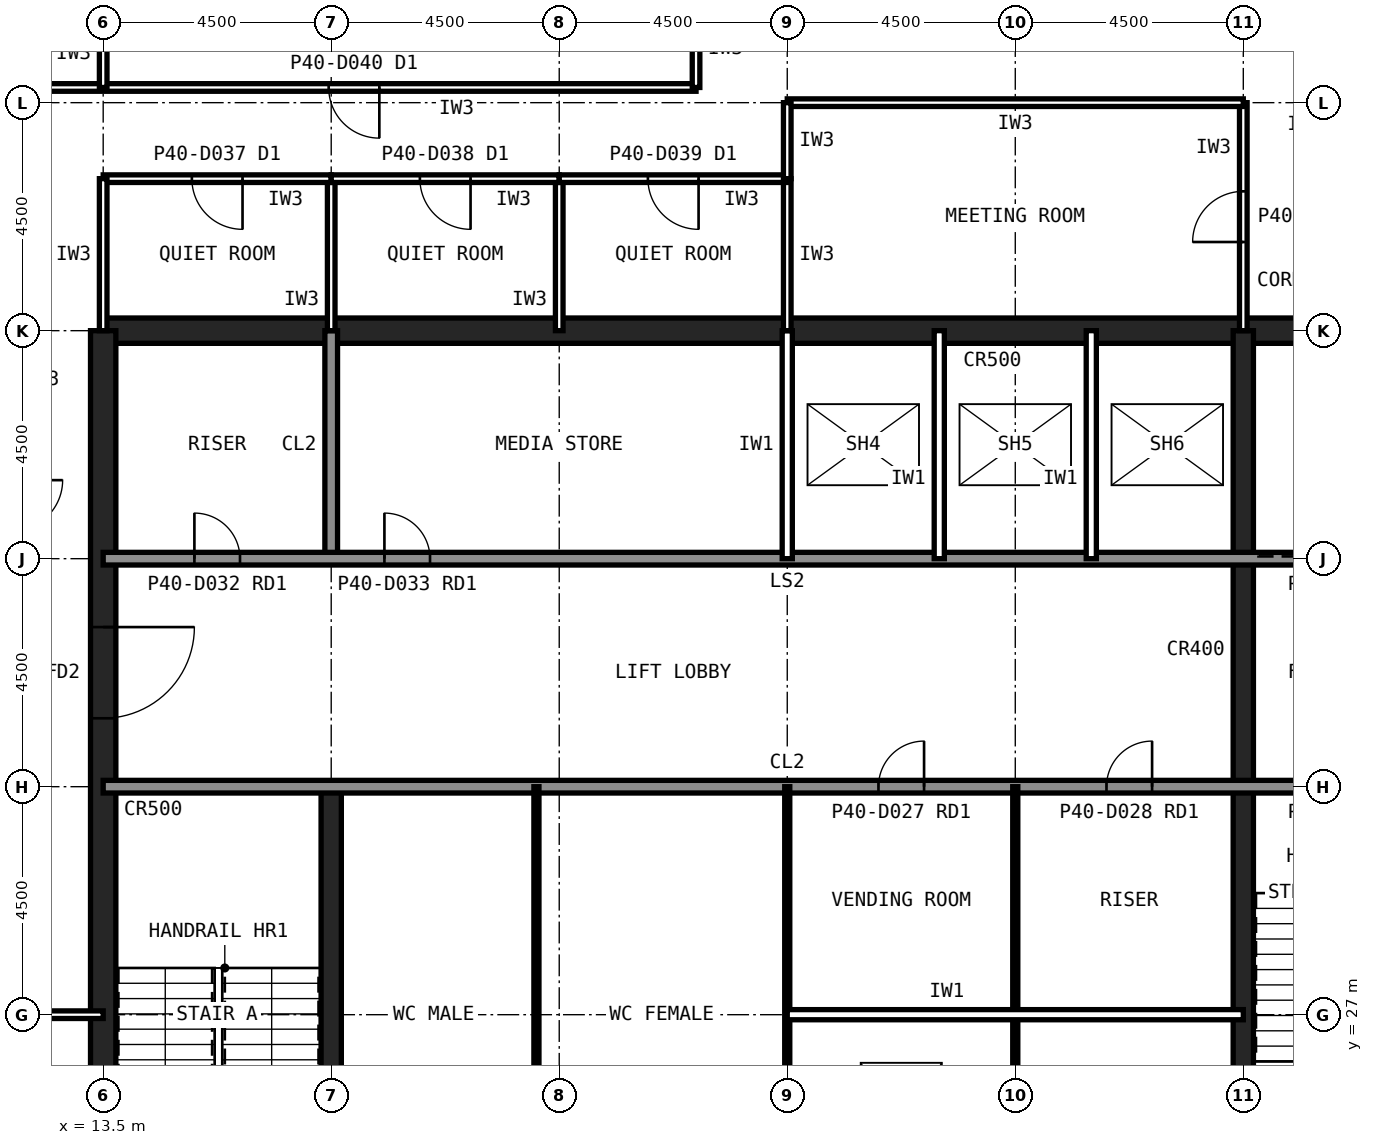
"""IFC4 building model, lengths in metres.
Left out: names, types, materials, properties, quantities, classifications, styles, units other than length and angle.
Written with IfcOpenShell. Run it as: python <this file> out.ifc"""

import sys

from ifc_helpers import new_model, si_unit, direction, frame, frame_2d, origin, place, context, subcontext, project, spatial, rectangle, extrude, element, fill, save


model = new_model("IFC4")
c1 = context("Model", 3, precision=1e-05, world=origin(), true_north=direction((0.0, 1.0)))
c2 = subcontext(c1, "Body", "Model", "MODEL_VIEW")
j1 = project(units=[si_unit("LENGTHUNIT", "METRE"), si_unit("PLANEANGLEUNIT", "RADIAN")], contexts=[c1])
p1 = place(None, origin())
s1 = spatial("IfcSite", under=j1, at=p1, CompositionType="ELEMENT")
p2 = place(p1, origin())
s2 = spatial("IfcBuilding", under=s1, at=p2, CompositionType="ELEMENT")
p3 = place(p2, frame((0.0, 0.0, 167.6)))
s3 = spatial("IfcBuildingStorey", under=s2, at=p3, CompositionType="ELEMENT", Elevation=167.6)
p4 = place(p3, frame((40.5, 40.5, 0.0), z_axis=(0.0, 0.0, 1.0), x_axis=(-1.0, 0.0, 0.0)))
e1 = element("IfcWall", 1, at=p4, inside=s3, PredefinedType="SHEAR", context=c2, shape_type="SweptSolid", body=[
    extrude(rectangle(XDim=27.0, YDim=0.5, at=frame_2d((13.5, 0.0))), origin(), (0.0, 0.0, 1.0), 4.0),
])
p5 = place(p3, frame((13.5, 40.5, 0.0), z_axis=(0.0, 0.0, 1.0), x_axis=(0.0, -1.0, 0.0)))
e2 = element("IfcWall", 2, at=p5, inside=s3, PredefinedType="SHEAR", context=c2, shape_type="SweptSolid", body=[
    extrude(rectangle(XDim=27.0, YDim=0.5, at=frame_2d((13.5, 0.0))), origin(), (0.0, 0.0, 1.0), 4.0),
])
p6 = place(p5, frame((19.65, 0.0, 0.0)))
e3 = element("IfcOpeningElement", 3, at=p6, cuts=e2, PredefinedType="OPENING", context=c2, shape_type="SweptSolid", body=[
    extrude(rectangle(XDim=1.2, YDim=2.1, at=frame_2d((0.6, 1.05))), frame((0.0, 0.26, 0.0), z_axis=(0.0, -1.0, 0.0), x_axis=(1.0, 0.0, 0.0)), (0.0, 0.0, 1.0), 0.52),
])
p7 = place(p5, frame((5.85, 0.0, 0.0)))
e4 = element("IfcOpeningElement", 4, at=p7, cuts=e2, PredefinedType="OPENING", context=c2, shape_type="SweptSolid", body=[
    extrude(rectangle(XDim=1.8, YDim=2.1, at=frame_2d((0.9, 1.05))), frame((0.0, 0.26, 0.0), z_axis=(0.0, -1.0, 0.0), x_axis=(1.0, 0.0, 0.0)), (0.0, 0.0, 1.0), 0.52),
])
p8 = place(p3, frame((18.0, 13.5, 0.0), z_axis=(0.0, 0.0, 1.0), x_axis=(0.0, 1.0, 0.0)))
e5 = element("IfcWall", 5, at=p8, inside=s3, PredefinedType="SHEAR", context=c2, shape_type="SweptSolid", body=[
    extrude(rectangle(XDim=18.0, YDim=0.4, at=frame_2d((9.0, 0.0))), origin(), (0.0, 0.0, 1.0), 4.0),
])
p9 = place(p3, frame((18.0, 36.0, 0.0), z_axis=(0.0, 0.0, 1.0), x_axis=(0.0, 1.0, 0.0)))
e6 = element("IfcWall", 6, at=p9, inside=s3, PredefinedType="SOLIDWALL", context=c2, shape_type="SweptSolid", body=[
    extrude(rectangle(XDim=4.5, YDim=0.25, at=frame_2d((2.25, 0.0))), origin(), (0.0, 0.0, 1.0), 3.84),
])
p10 = place(p3, frame((36.0, 22.5, 0.0), z_axis=(0.0, 0.0, 1.0), x_axis=(0.0, 1.0, 0.0)))
e7 = element("IfcWall", 7, at=p10, inside=s3, PredefinedType="SHEAR", context=c2, shape_type="SweptSolid", body=[
    extrude(rectangle(XDim=18.0, YDim=0.4, at=frame_2d((9.0, 0.0))), origin(), (0.0, 0.0, 1.0), 4.0),
])
p11 = place(p3, frame((13.5, 36.0, 0.0), z_axis=(0.0, 0.0, 1.0), x_axis=(1.0, 0.0, 0.0)))
e8 = element("IfcWall", 8, at=p11, inside=s3, PredefinedType="SOLIDWALL", context=c2, shape_type="SweptSolid", body=[
    extrude(rectangle(XDim=27.0, YDim=0.25, at=frame_2d((13.5, 0.0))), origin(), (0.0, 0.0, 1.0), 3.84),
])
p12 = place(p11, frame((1.8, 0.0, 0.0)))
e9 = element("IfcOpeningElement", 9, at=p12, cuts=e8, PredefinedType="OPENING", context=c2, shape_type="SweptSolid", body=[
    extrude(rectangle(XDim=0.9, YDim=2.1, at=frame_2d((0.45, 1.05))), frame((0.0, 0.135, 0.0), z_axis=(0.0, -1.0, 0.0), x_axis=(1.0, 0.0, 0.0)), (0.0, 0.0, 1.0), 0.27),
])
p13 = place(p11, frame((5.55, 0.0, 0.0)))
e10 = element("IfcOpeningElement", 10, at=p13, cuts=e8, PredefinedType="OPENING", context=c2, shape_type="SweptSolid", body=[
    extrude(rectangle(XDim=0.9, YDim=2.1, at=frame_2d((0.45, 1.05))), frame((0.0, 0.135, 0.0), z_axis=(0.0, -1.0, 0.0), x_axis=(1.0, 0.0, 0.0)), (0.0, 0.0, 1.0), 0.27),
])
p14 = place(p11, frame((8.55, 0.0, 0.0)))
e11 = element("IfcOpeningElement", 11, at=p14, cuts=e8, PredefinedType="OPENING", context=c2, shape_type="SweptSolid", body=[
    extrude(rectangle(XDim=0.9, YDim=2.1, at=frame_2d((0.45, 1.05))), frame((0.0, 0.135, 0.0), z_axis=(0.0, -1.0, 0.0), x_axis=(1.0, 0.0, 0.0)), (0.0, 0.0, 1.0), 0.27),
])
p15 = place(p11, frame((24.1, 0.0, 0.0)))
e12 = element("IfcOpeningElement", 12, at=p15, cuts=e8, PredefinedType="OPENING", context=c2, shape_type="SweptSolid", body=[
    extrude(rectangle(XDim=1.3, YDim=2.2, at=frame_2d((0.65, 1.1))), frame((0.0, 0.135, 0.0), z_axis=(0.0, -1.0, 0.0), x_axis=(1.0, 0.0, 0.0)), (0.0, 0.0, 1.0), 0.27),
])
p16 = place(p3, frame((13.5, 31.5, 0.0), z_axis=(0.0, 0.0, 1.0), x_axis=(1.0, 0.0, 0.0)))
e13 = element("IfcWall", 13, at=p16, inside=s3, PredefinedType="SOLIDWALL", context=c2, shape_type="SweptSolid", body=[
    extrude(rectangle(XDim=27.0, YDim=0.25, at=frame_2d((13.5, 0.0))), origin(), (0.0, 0.0, 1.0), 3.84),
])
p17 = place(p16, frame((24.15, 0.0, 0.0)))
e14 = element("IfcOpeningElement", 14, at=p17, cuts=e13, PredefinedType="OPENING", context=c2, shape_type="SweptSolid", body=[
    extrude(rectangle(XDim=1.2, YDim=2.1, at=frame_2d((0.6, 1.05))), frame((0.0, 0.135, 0.0), z_axis=(0.0, -1.0, 0.0), x_axis=(1.0, 0.0, 0.0)), (0.0, 0.0, 1.0), 0.27),
])
p18 = place(p16, frame((15.3, 0.0, 0.0)))
e15 = element("IfcOpeningElement", 15, at=p18, cuts=e13, PredefinedType="OPENING", context=c2, shape_type="SweptSolid", body=[
    extrude(rectangle(XDim=0.9, YDim=2.1, at=frame_2d((0.45, 1.05))), frame((0.0, 0.135, 0.0), z_axis=(0.0, -1.0, 0.0), x_axis=(1.0, 0.0, 0.0)), (0.0, 0.0, 1.0), 0.27),
])
p19 = place(p16, frame((19.8, 0.0, 0.0)))
e16 = element("IfcOpeningElement", 16, at=p19, cuts=e13, PredefinedType="OPENING", context=c2, shape_type="SweptSolid", body=[
    extrude(rectangle(XDim=0.9, YDim=2.1, at=frame_2d((0.45, 1.05))), frame((0.0, 0.135, 0.0), z_axis=(0.0, -1.0, 0.0), x_axis=(1.0, 0.0, 0.0)), (0.0, 0.0, 1.0), 0.27),
])
for number, where, z_axis, x_axis in (
    (17, (21.0, 36.0, 0.0), (0.0, 0.0, 1.0), (0.0, 1.0, 0.0)),
    (18, (27.0, 36.0, 0.0), (0.0, 0.0, 1.0), (0.0, 1.0, 0.0)),
    (19, (30.0, 36.0, 0.0), (0.0, 0.0, 1.0), (0.0, 1.0, 0.0)),
    (20, (33.0, 36.0, 0.0), (0.0, 0.0, 1.0), (0.0, 1.0, 0.0)),
):
    element("IfcWall", number, at=place(p3, frame(where, z_axis=z_axis, x_axis=x_axis)), inside=s3, PredefinedType="PARTITIONING", context=c2, shape_type="SweptSolid", body=[
        extrude(rectangle(XDim=4.5, YDim=0.2, at=frame_2d((2.25, 0.0))), origin(), (0.0, 0.0, 1.0), 3.84),
    ])
for number, where, z_axis, x_axis in (
    (21, (22.05, 22.5, 0.0), (0.0, 0.0, 1.0), (0.0, 1.0, 0.0)),
    (22, (27.0, 22.5, 0.0), (0.0, 0.0, 1.0), (0.0, 1.0, 0.0)),
    (23, (31.5, 22.5, 0.0), (0.0, 0.0, 1.0), (0.0, 1.0, 0.0)),
):
    element("IfcWall", number, at=place(p3, frame(where, z_axis=z_axis, x_axis=x_axis)), inside=s3, PredefinedType="PLUMBINGWALL", context=c2, shape_type="SweptSolid", body=[
        extrude(rectangle(XDim=9.0, YDim=0.1, at=frame_2d((4.5, 0.0))), origin(), (0.0, 0.0, 1.0), 3.84),
    ])
p20 = place(p3, frame((27.0, 27.0, 0.0), z_axis=(0.0, 0.0, 1.0), x_axis=(1.0, 0.0, 0.0)))
e24 = element("IfcWall", 24, at=p20, inside=s3, PredefinedType="PARTITIONING", context=c2, shape_type="SweptSolid", body=[
    extrude(rectangle(XDim=9.0, YDim=0.2, at=frame_2d((4.5, 0.0))), origin(), (0.0, 0.0, 1.0), 3.84),
])
p21 = place(p3, frame((0.36, 27.0, 0.0), z_axis=(0.0, 0.0, 1.0), x_axis=(1.0, 0.0, 0.0)))
e25 = element("IfcWall", 25, at=p21, inside=s3, PredefinedType="PARTITIONING", context=c2, shape_type="SweptSolid", body=[
    extrude(rectangle(XDim=13.14, YDim=0.15, at=frame_2d((6.57, 0.0))), origin(), (0.0, 0.0, 1.0), 2.989),
])
p22 = place(p3, frame((25.2, 45.3, 0.0), z_axis=(0.0, 0.0, 1.0), x_axis=(-1.0, 0.0, 0.0)))
e26 = element("IfcWall", 26, at=p22, inside=s3, PredefinedType="PARTITIONING", context=c2, shape_type="SweptSolid", body=[
    extrude(rectangle(XDim=13.5, YDim=0.15, at=frame_2d((6.75, 0.0))), origin(), (0.0, 0.0, 1.0), 3.84),
])
p23 = place(p22, frame((6.25, 0.0, 0.0)))
e27 = element("IfcOpeningElement", 27, at=p23, cuts=e26, PredefinedType="OPENING", context=c2, shape_type="SweptSolid", body=[
    extrude(rectangle(XDim=1.0, YDim=2.1, at=frame_2d((0.5, 1.05))), frame((0.0, 0.085, 0.0), z_axis=(0.0, -1.0, 0.0), x_axis=(1.0, 0.0, 0.0)), (0.0, 0.0, 1.0), 0.17),
])
p24 = place(p3, frame((25.2, 46.8, 0.0), z_axis=(0.0, 0.0, 1.0), x_axis=(0.0, -1.0, 0.0)))
e28 = element("IfcWall", 28, at=p24, inside=s3, PredefinedType="PARTITIONING", context=c2, shape_type="SweptSolid", body=[
    extrude(rectangle(XDim=1.5, YDim=0.15, at=frame_2d((0.75, 0.0))), origin(), (0.0, 0.0, 1.0), 3.84),
])
p25 = place(p3, frame((18.0, 40.5, 0.0), z_axis=(0.0, 0.0, 1.0), x_axis=(0.0, 1.0, 0.0)))
e29 = element("IfcWall", 29, at=p25, inside=s3, PredefinedType="PARTITIONING", context=c2, shape_type="SweptSolid", body=[
    extrude(rectangle(XDim=3.0, YDim=0.15, at=frame_2d((1.5, 0.0))), origin(), (0.0, 0.0, 1.0), 2.989),
])
p26 = place(p3, frame((18.0, 43.5, 0.0), z_axis=(0.0, 0.0, 1.0), x_axis=(-1.0, 0.0, 0.0)))
e30 = element("IfcWall", 30, at=p26, inside=s3, PredefinedType="PARTITIONING", context=c2, shape_type="SweptSolid", body=[
    extrude(rectangle(XDim=4.5, YDim=0.15, at=frame_2d((2.25, 0.0))), origin(), (0.0, 0.0, 1.0), 3.84),
])
p27 = place(p26, frame((1.75, 0.0, 0.0)))
e31 = element("IfcOpeningElement", 31, at=p27, cuts=e30, PredefinedType="OPENING", context=c2, shape_type="SweptSolid", body=[
    extrude(rectangle(XDim=1.0, YDim=2.1, at=frame_2d((0.5, 1.05))), frame((0.0, 0.085, 0.0), z_axis=(0.0, -1.0, 0.0), x_axis=(1.0, 0.0, 0.0)), (0.0, 0.0, 1.0), 0.17),
])
for number, where, z_axis, x_axis in (
    (32, (13.5, 43.5, 0.0), (0.0, 0.0, 1.0), (0.0, -1.0, 0.0)),
    (33, (22.5, 40.5, 0.0), (0.0, 0.0, 1.0), (0.0, 1.0, 0.0)),
):
    element("IfcWall", number, at=place(p3, frame(where, z_axis=z_axis, x_axis=x_axis)), inside=s3, PredefinedType="PARTITIONING", context=c2, shape_type="SweptSolid", body=[
        extrude(rectangle(XDim=3.0, YDim=0.15, at=frame_2d((1.5, 0.0))), origin(), (0.0, 0.0, 1.0), 2.989),
    ])
p28 = place(p3, frame((22.5, 43.5, 0.0), z_axis=(0.0, 0.0, 1.0), x_axis=(-1.0, 0.0, 0.0)))
e34 = element("IfcWall", 34, at=p28, inside=s3, PredefinedType="PARTITIONING", context=c2, shape_type="SweptSolid", body=[
    extrude(rectangle(XDim=4.5, YDim=0.15, at=frame_2d((2.25, 0.0))), origin(), (0.0, 0.0, 1.0), 3.84),
])
p29 = place(p28, frame((1.75, 0.0, 0.0)))
e35 = element("IfcOpeningElement", 35, at=p29, cuts=e34, PredefinedType="OPENING", context=c2, shape_type="SweptSolid", body=[
    extrude(rectangle(XDim=1.0, YDim=2.1, at=frame_2d((0.5, 1.05))), frame((0.0, 0.085, 0.0), z_axis=(0.0, -1.0, 0.0), x_axis=(1.0, 0.0, 0.0)), (0.0, 0.0, 1.0), 0.17),
])
p30 = place(p3, frame((27.0, 40.5, 0.0), z_axis=(0.0, 0.0, 1.0), x_axis=(0.0, 1.0, 0.0)))
e36 = element("IfcWall", 36, at=p30, inside=s3, PredefinedType="PARTITIONING", context=c2, shape_type="SweptSolid", body=[
    extrude(rectangle(XDim=3.0, YDim=0.15, at=frame_2d((1.5, 0.0))), origin(), (0.0, 0.0, 1.0), 2.989),
])
p31 = place(p3, frame((27.0, 43.5, 0.0), z_axis=(0.0, 0.0, 1.0), x_axis=(-1.0, 0.0, 0.0)))
e37 = element("IfcWall", 37, at=p31, inside=s3, PredefinedType="PARTITIONING", context=c2, shape_type="SweptSolid", body=[
    extrude(rectangle(XDim=4.5, YDim=0.15, at=frame_2d((2.25, 0.0))), origin(), (0.0, 0.0, 1.0), 3.84),
])
p32 = place(p31, frame((1.75, 0.0, 0.0)))
e38 = element("IfcOpeningElement", 38, at=p32, cuts=e37, PredefinedType="OPENING", context=c2, shape_type="SweptSolid", body=[
    extrude(rectangle(XDim=1.0, YDim=2.1, at=frame_2d((0.5, 1.05))), frame((0.0, 0.085, 0.0), z_axis=(0.0, -1.0, 0.0), x_axis=(1.0, 0.0, 0.0)), (0.0, 0.0, 1.0), 0.17),
])
p33 = place(p3, frame((36.0, 40.5, 0.0), z_axis=(0.0, 0.0, 1.0), x_axis=(0.0, 1.0, 0.0)))
e39 = element("IfcWall", 39, at=p33, inside=s3, PredefinedType="PARTITIONING", context=c2, shape_type="SweptSolid", body=[
    extrude(rectangle(XDim=4.5, YDim=0.15, at=frame_2d((2.25, 0.0))), origin(), (0.0, 0.0, 1.0), 2.989),
])
p34 = place(p33, frame((1.75, 0.0, 0.0)))
e40 = element("IfcOpeningElement", 40, at=p34, cuts=e39, PredefinedType="OPENING", context=c2, shape_type="SweptSolid", body=[
    extrude(rectangle(XDim=1.0, YDim=2.1, at=frame_2d((0.5, 1.05))), frame((0.0, 0.085, 0.0), z_axis=(0.0, -1.0, 0.0), x_axis=(1.0, 0.0, 0.0)), (0.0, 0.0, 1.0), 0.17),
])
p35 = place(p3, frame((36.0, 45.0, 0.0), z_axis=(0.0, 0.0, 1.0), x_axis=(-1.0, 0.0, 0.0)))
e41 = element("IfcWall", 41, at=p35, inside=s3, PredefinedType="PARTITIONING", context=c2, shape_type="SweptSolid", body=[
    extrude(rectangle(XDim=9.0, YDim=0.15, at=frame_2d((4.5, 0.0))), origin(), (0.0, 0.0, 1.0), 3.84),
])
p36 = place(p3, frame((27.0, 45.0, 0.0), z_axis=(0.0, 0.0, 1.0), x_axis=(0.0, -1.0, 0.0)))
e42 = element("IfcWall", 42, at=p36, inside=s3, PredefinedType="PARTITIONING", context=c2, shape_type="SweptSolid", body=[
    extrude(rectangle(XDim=1.5, YDim=0.15, at=frame_2d((0.75, 0.0))), origin(), (0.0, 0.0, 1.0), 2.989),
])
p37 = place(p3, frame((13.5, 45.3, 0.0), z_axis=(0.0, 0.0, 1.0), x_axis=(0.0, 1.0, 0.0)))
e43 = element("IfcWall", 43, at=p37, inside=s3, PredefinedType="PARTITIONING", context=c2, shape_type="SweptSolid", body=[
    extrude(rectangle(XDim=3.3, YDim=0.15, at=frame_2d((1.65, 0.0))), origin(), (0.0, 0.0, 1.0), 2.989),
])
p38 = place(p37, frame((1.15, 0.0, 0.0)))
e44 = element("IfcOpeningElement", 44, at=p38, cuts=e43, PredefinedType="OPENING", context=c2, shape_type="SweptSolid", body=[
    extrude(rectangle(XDim=1.0, YDim=2.1, at=frame_2d((0.5, 1.05))), frame((0.0, 0.085, 0.0), z_axis=(0.0, -1.0, 0.0), x_axis=(1.0, 0.0, 0.0)), (0.0, 0.0, 1.0), 0.17),
])
p39 = place(p7, origin())
e45 = element("IfcDoor", 45, at=p39, inside=s3, OperationType="SINGLE_SWING_LEFT", PredefinedType="DOOR", context=c2, shape_type="SweptSolid", body=[
    extrude(rectangle(XDim=1.8, YDim=2.1, at=frame_2d((0.9, 1.05))), frame((0.0, 0.025, 0.0), z_axis=(0.0, -1.0, 0.0), x_axis=(1.0, 0.0, 0.0)), (0.0, 0.0, 1.0), 0.05),
])
fill(e4, e45)
p40 = place(p18, origin())
e46 = element("IfcDoor", 46, at=p40, inside=s3, OperationType="SINGLE_SWING_RIGHT", PredefinedType="DOOR", context=c2, shape_type="SweptSolid", body=[
    extrude(rectangle(XDim=0.9, YDim=2.1, at=frame_2d((0.45, 1.05))), frame((0.0, 0.025, 0.0), z_axis=(0.0, -1.0, 0.0), x_axis=(1.0, 0.0, 0.0)), (0.0, 0.0, 1.0), 0.05),
])
fill(e15, e46)
p41 = place(p19, origin())
e47 = element("IfcDoor", 47, at=p41, inside=s3, OperationType="SINGLE_SWING_RIGHT", PredefinedType="DOOR", context=c2, shape_type="SweptSolid", body=[
    extrude(rectangle(XDim=0.9, YDim=2.1, at=frame_2d((0.45, 1.05))), frame((0.0, 0.025, 0.0), z_axis=(0.0, -1.0, 0.0), x_axis=(1.0, 0.0, 0.0)), (0.0, 0.0, 1.0), 0.05),
])
fill(e16, e47)
p42 = place(p12, origin())
e48 = element("IfcDoor", 48, at=p42, inside=s3, OperationType="SINGLE_SWING_LEFT", PredefinedType="DOOR", context=c2, shape_type="SweptSolid", body=[
    extrude(rectangle(XDim=0.9, YDim=2.1, at=frame_2d((0.45, 1.05))), frame((0.0, 0.025, 0.0), z_axis=(0.0, -1.0, 0.0), x_axis=(1.0, 0.0, 0.0)), (0.0, 0.0, 1.0), 0.05),
])
fill(e9, e48)
p43 = place(p13, origin())
e49 = element("IfcDoor", 49, at=p43, inside=s3, OperationType="SINGLE_SWING_LEFT", PredefinedType="DOOR", context=c2, shape_type="SweptSolid", body=[
    extrude(rectangle(XDim=0.9, YDim=2.1, at=frame_2d((0.45, 1.05))), frame((0.0, 0.025, 0.0), z_axis=(0.0, -1.0, 0.0), x_axis=(1.0, 0.0, 0.0)), (0.0, 0.0, 1.0), 0.05),
])
fill(e10, e49)
p44 = place(p14, origin())
e50 = element("IfcDoor", 50, at=p44, inside=s3, OperationType="SINGLE_SWING_LEFT", PredefinedType="DOOR", context=c2, shape_type="SweptSolid", body=[
    extrude(rectangle(XDim=0.9, YDim=2.1, at=frame_2d((0.45, 1.05))), frame((0.0, 0.025, 0.0), z_axis=(0.0, -1.0, 0.0), x_axis=(1.0, 0.0, 0.0)), (0.0, 0.0, 1.0), 0.05),
])
fill(e11, e50)
p45 = place(p23, origin())
e51 = element("IfcDoor", 51, at=p45, inside=s3, OperationType="SINGLE_SWING_LEFT", PredefinedType="DOOR", context=c2, shape_type="SweptSolid", body=[
    extrude(rectangle(XDim=1.0, YDim=2.1, at=frame_2d((0.5, 1.05))), frame((0.0, 0.025, 0.0), z_axis=(0.0, -1.0, 0.0), x_axis=(1.0, 0.0, 0.0)), (0.0, 0.0, 1.0), 0.05),
])
fill(e27, e51)
p46 = place(p27, origin())
e52 = element("IfcDoor", 52, at=p46, inside=s3, OperationType="SINGLE_SWING_LEFT", PredefinedType="DOOR", context=c2, shape_type="SweptSolid", body=[
    extrude(rectangle(XDim=1.0, YDim=2.1, at=frame_2d((0.5, 1.05))), frame((0.0, 0.025, 0.0), z_axis=(0.0, -1.0, 0.0), x_axis=(1.0, 0.0, 0.0)), (0.0, 0.0, 1.0), 0.05),
])
fill(e31, e52)
p47 = place(p29, origin())
e53 = element("IfcDoor", 53, at=p47, inside=s3, OperationType="SINGLE_SWING_LEFT", PredefinedType="DOOR", context=c2, shape_type="SweptSolid", body=[
    extrude(rectangle(XDim=1.0, YDim=2.1, at=frame_2d((0.5, 1.05))), frame((0.0, 0.025, 0.0), z_axis=(0.0, -1.0, 0.0), x_axis=(1.0, 0.0, 0.0)), (0.0, 0.0, 1.0), 0.05),
])
fill(e35, e53)
p48 = place(p32, origin())
e54 = element("IfcDoor", 54, at=p48, inside=s3, OperationType="SINGLE_SWING_LEFT", PredefinedType="DOOR", context=c2, shape_type="SweptSolid", body=[
    extrude(rectangle(XDim=1.0, YDim=2.1, at=frame_2d((0.5, 1.05))), frame((0.0, 0.025, 0.0), z_axis=(0.0, -1.0, 0.0), x_axis=(1.0, 0.0, 0.0)), (0.0, 0.0, 1.0), 0.05),
])
fill(e38, e54)
p49 = place(p34, origin())
e55 = element("IfcDoor", 55, at=p49, inside=s3, OperationType="SINGLE_SWING_LEFT", PredefinedType="DOOR", context=c2, shape_type="SweptSolid", body=[
    extrude(rectangle(XDim=1.0, YDim=2.1, at=frame_2d((0.5, 1.05))), frame((0.0, 0.025, 0.0), z_axis=(0.0, -1.0, 0.0), x_axis=(1.0, 0.0, 0.0)), (0.0, 0.0, 1.0), 0.05),
])
fill(e40, e55)
save(model, sys.argv[1])
